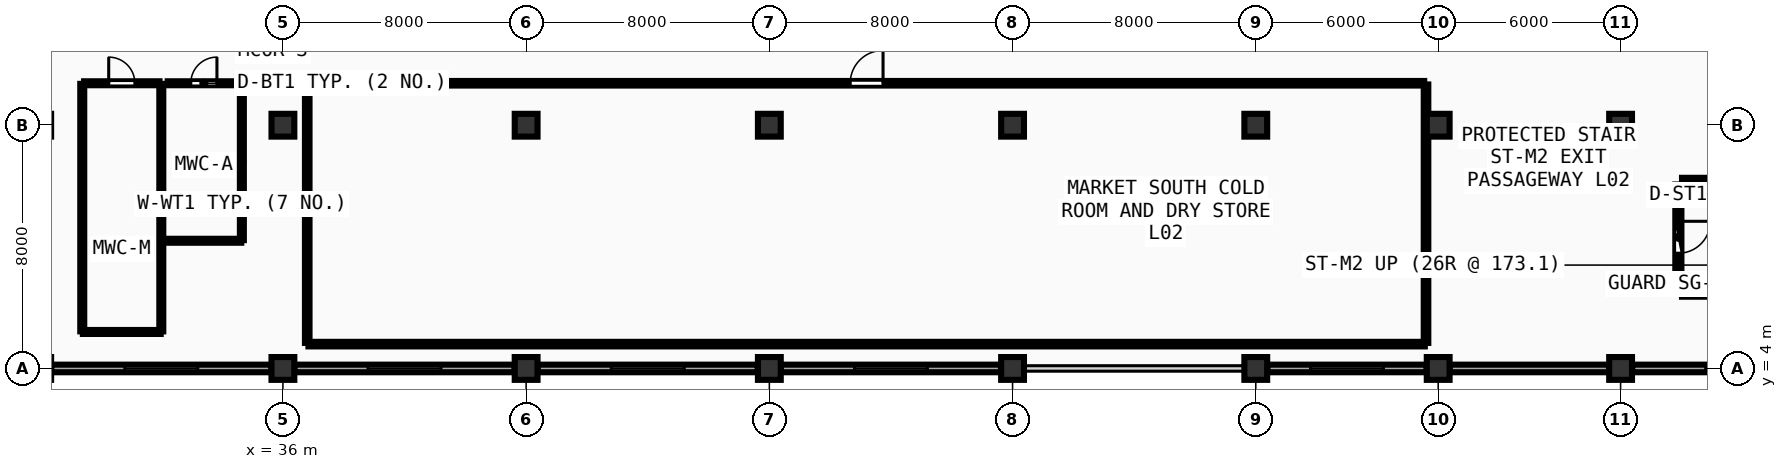
"""IFC4 building model, lengths in metres.
Left out: names, types, materials, properties, quantities, classifications, styles, units other than length and angle.
Written with IfcOpenShell. Run it as: python <this file> out.ifc"""

import sys

from ifc_helpers import new_model, si_unit, direction, frame, frame_2d, origin, origin_2d, place, context, subcontext, project, spatial, rectangle, extrude, element, fill, save


model = new_model("IFC4")
c1 = context("Model", 3, precision=1e-05, world=origin(), true_north=direction((0.0, 1.0)))
c2 = subcontext(c1, "Body", "Model", "MODEL_VIEW")
j1 = project(units=[si_unit("LENGTHUNIT", "METRE"), si_unit("PLANEANGLEUNIT", "RADIAN")], contexts=[c1])
p1 = place(None, origin())
s1 = spatial("IfcSite", under=j1, at=p1, CompositionType="ELEMENT")
p2 = place(p1, origin())
s2 = spatial("IfcBuilding", under=s1, at=p2, CompositionType="ELEMENT")
p3 = place(p2, frame((0.0, 0.0, 9.0)))
s3 = spatial("IfcBuildingStorey", under=s2, at=p3, CompositionType="ELEMENT", Elevation=9.0)
for number, where, z_axis, x_axis in (
    (1, (36.0, 4.0, 0.0), (0.0, 0.0, 1.0), (1.0, 0.0, 0.0)),
    (2, (36.0, 12.0, 0.0), (0.0, 0.0, 1.0), (1.0, 0.0, 0.0)),
    (3, (44.0, 4.0, 0.0), (0.0, 0.0, 1.0), (1.0, 0.0, 0.0)),
    (4, (44.0, 12.0, 0.0), (0.0, 0.0, 1.0), (1.0, 0.0, 0.0)),
    (5, (52.0, 4.0, 0.0), (0.0, 0.0, 1.0), (1.0, 0.0, 0.0)),
    (6, (52.0, 12.0, 0.0), (0.0, 0.0, 1.0), (1.0, 0.0, 0.0)),
    (7, (60.0, 4.0, 0.0), (0.0, 0.0, 1.0), (1.0, 0.0, 0.0)),
    (8, (60.0, 12.0, 0.0), (0.0, 0.0, 1.0), (1.0, 0.0, 0.0)),
    (9, (68.0, 4.0, 0.0), (0.0, 0.0, 1.0), (1.0, 0.0, 0.0)),
    (10, (68.0, 12.0, 0.0), (0.0, 0.0, 1.0), (1.0, 0.0, 0.0)),
    (11, (74.0, 4.0, 0.0), (0.0, 0.0, 1.0), (1.0, 0.0, 0.0)),
    (12, (74.0, 12.0, 0.0), (0.0, 0.0, 1.0), (1.0, 0.0, 0.0)),
    (13, (80.0, 4.0, 0.0), (0.0, 0.0, 1.0), (1.0, 0.0, 0.0)),
    (14, (80.0, 12.0, 0.0), (0.0, 0.0, 1.0), (1.0, 0.0, 0.0)),
):
    element("IfcColumn", number, at=place(p3, frame(where, z_axis=z_axis, x_axis=x_axis)), inside=s3, PredefinedType="COLUMN", context=c2, shape_type="SweptSolid", body=[
        extrude(rectangle(XDim=0.75, YDim=0.75, at=origin_2d()), origin(), (0.0, 0.0, 1.0), 4.5),
    ])
p4 = place(p3, frame((28.38, 4.0, 0.0), z_axis=(0.0, 0.0, 1.0), x_axis=(1.0, 0.0, 0.0)))
e15 = element("IfcWall", 15, at=p4, inside=s3, PredefinedType="SOLIDWALL", context=c2, shape_type="SweptSolid", body=[
    extrude(rectangle(XDim=7.24, YDim=0.25, at=frame_2d((3.62, 0.0))), origin(), (0.0, 0.0, 1.0), 3.42),
])
p5 = place(p4, frame((2.42, 0.0, 0.95)))
e16 = element("IfcOpeningElement", 16, at=p5, cuts=e15, PredefinedType="OPENING", context=c2, shape_type="SweptSolid", body=[
    extrude(rectangle(XDim=2.4, YDim=1.65, at=frame_2d((1.2, 0.825))), frame((0.0, 0.135, 0.0), z_axis=(0.0, -1.0, 0.0), x_axis=(1.0, 0.0, 0.0)), (0.0, 0.0, 1.0), 0.27),
])
p6 = place(p3, frame((36.38, 4.0, 0.0), z_axis=(0.0, 0.0, 1.0), x_axis=(1.0, 0.0, 0.0)))
e17 = element("IfcWall", 17, at=p6, inside=s3, PredefinedType="SOLIDWALL", context=c2, shape_type="SweptSolid", body=[
    extrude(rectangle(XDim=7.24, YDim=0.25, at=frame_2d((3.62, 0.0))), origin(), (0.0, 0.0, 1.0), 3.42),
])
p7 = place(p6, frame((2.42, 0.0, 0.95)))
e18 = element("IfcOpeningElement", 18, at=p7, cuts=e17, PredefinedType="OPENING", context=c2, shape_type="SweptSolid", body=[
    extrude(rectangle(XDim=2.4, YDim=1.65, at=frame_2d((1.2, 0.825))), frame((0.0, 0.135, 0.0), z_axis=(0.0, -1.0, 0.0), x_axis=(1.0, 0.0, 0.0)), (0.0, 0.0, 1.0), 0.27),
])
p8 = place(p3, frame((44.38, 4.0, 0.0), z_axis=(0.0, 0.0, 1.0), x_axis=(1.0, 0.0, 0.0)))
e19 = element("IfcWall", 19, at=p8, inside=s3, PredefinedType="SOLIDWALL", context=c2, shape_type="SweptSolid", body=[
    extrude(rectangle(XDim=7.24, YDim=0.25, at=frame_2d((3.62, 0.0))), origin(), (0.0, 0.0, 1.0), 3.42),
])
p9 = place(p8, frame((2.42, 0.0, 0.95)))
e20 = element("IfcOpeningElement", 20, at=p9, cuts=e19, PredefinedType="OPENING", context=c2, shape_type="SweptSolid", body=[
    extrude(rectangle(XDim=2.4, YDim=1.65, at=frame_2d((1.2, 0.825))), frame((0.0, 0.135, 0.0), z_axis=(0.0, -1.0, 0.0), x_axis=(1.0, 0.0, 0.0)), (0.0, 0.0, 1.0), 0.27),
])
p10 = place(p3, frame((52.38, 4.0, 0.0), z_axis=(0.0, 0.0, 1.0), x_axis=(1.0, 0.0, 0.0)))
e21 = element("IfcWall", 21, at=p10, inside=s3, PredefinedType="SOLIDWALL", context=c2, shape_type="SweptSolid", body=[
    extrude(rectangle(XDim=7.24, YDim=0.25, at=frame_2d((3.62, 0.0))), origin(), (0.0, 0.0, 1.0), 3.42),
])
p11 = place(p10, frame((2.42, 0.0, 0.95)))
e22 = element("IfcOpeningElement", 22, at=p11, cuts=e21, PredefinedType="OPENING", context=c2, shape_type="SweptSolid", body=[
    extrude(rectangle(XDim=2.4, YDim=1.65, at=frame_2d((1.2, 0.825))), frame((0.0, 0.135, 0.0), z_axis=(0.0, -1.0, 0.0), x_axis=(1.0, 0.0, 0.0)), (0.0, 0.0, 1.0), 0.27),
])
p12 = place(p3, frame((68.38, 4.0, 0.0), z_axis=(0.0, 0.0, 1.0), x_axis=(1.0, 0.0, 0.0)))
e23 = element("IfcWall", 23, at=p12, inside=s3, PredefinedType="SOLIDWALL", context=c2, shape_type="SweptSolid", body=[
    extrude(rectangle(XDim=5.24, YDim=0.25, at=frame_2d((2.62, 0.0))), origin(), (0.0, 0.0, 1.0), 3.42),
])
p13 = place(p12, frame((1.42, 0.0, 0.95)))
e24 = element("IfcOpeningElement", 24, at=p13, cuts=e23, PredefinedType="OPENING", context=c2, shape_type="SweptSolid", body=[
    extrude(rectangle(XDim=2.4, YDim=1.65, at=frame_2d((1.2, 0.825))), frame((0.0, 0.135, 0.0), z_axis=(0.0, -1.0, 0.0), x_axis=(1.0, 0.0, 0.0)), (0.0, 0.0, 1.0), 0.27),
])
p14 = place(p3, frame((74.38, 4.0, 0.0), z_axis=(0.0, 0.0, 1.0), x_axis=(1.0, 0.0, 0.0)))
e25 = element("IfcWall", 25, at=p14, inside=s3, PredefinedType="SOLIDWALL", context=c2, shape_type="SweptSolid", body=[
    extrude(rectangle(XDim=5.24, YDim=0.25, at=frame_2d((2.62, 0.0))), origin(), (0.0, 0.0, 1.0), 3.42),
])
p15 = place(p3, frame((80.38, 4.0, 0.0), z_axis=(0.0, 0.0, 1.0), x_axis=(1.0, 0.0, 0.0)))
e26 = element("IfcWall", 26, at=p15, inside=s3, PredefinedType="SOLIDWALL", context=c2, shape_type="SweptSolid", body=[
    extrude(rectangle(XDim=7.24, YDim=0.25, at=frame_2d((3.62, 0.0))), origin(), (0.0, 0.0, 1.0), 3.42),
])
p16 = place(p15, frame((2.42, 0.0, 0.95)))
e27 = element("IfcOpeningElement", 27, at=p16, cuts=e26, PredefinedType="OPENING", context=c2, shape_type="SweptSolid", body=[
    extrude(rectangle(XDim=2.4, YDim=1.65, at=frame_2d((1.2, 0.825))), frame((0.0, 0.135, 0.0), z_axis=(0.0, -1.0, 0.0), x_axis=(1.0, 0.0, 0.0)), (0.0, 0.0, 1.0), 0.27),
])
for number, where, z_axis, x_axis in (
    (28, (82.02, 6.46, 0.0), (0.0, 0.0, 1.0), (1.0, 0.0, 0.0)),
    (29, (89.78, 10.17, 0.0), (0.0, 0.0, 1.0), (-1.0, 0.0, 0.0)),
):
    element("IfcWall", number, at=place(p3, frame(where, z_axis=z_axis, x_axis=x_axis)), inside=s3, PredefinedType="SHEAR", context=c2, shape_type="SweptSolid", body=[
        extrude(rectangle(XDim=7.76, YDim=0.2, at=frame_2d((3.88, 0.0))), origin(), (0.0, 0.0, 1.0), 4.24),
    ])
p17 = place(p3, frame((81.9, 10.05, 0.0), z_axis=(0.0, 0.0, 1.0), x_axis=(0.0, -1.0, 0.0)))
e30 = element("IfcWall", 30, at=p17, inside=s3, PredefinedType="SHEAR", context=c2, shape_type="SweptSolid", body=[
    extrude(rectangle(XDim=3.47, YDim=0.2, at=frame_2d((1.735, 0.0))), origin(), (0.0, 0.0, 1.0), 4.24),
])
p18 = place(p17, frame((1.21, 0.0, 0.0)))
e31 = element("IfcOpeningElement", 31, at=p18, cuts=e30, PredefinedType="OPENING", context=c2, shape_type="SweptSolid", body=[
    extrude(rectangle(XDim=1.05, YDim=2.1, at=frame_2d((0.525, 1.05))), frame((0.0, 0.11, 0.0), z_axis=(0.0, -1.0, 0.0), x_axis=(1.0, 0.0, 0.0)), (0.0, 0.0, 1.0), 0.22),
])
p19 = place(p3, frame((29.46, 13.38, 0.0), z_axis=(0.0, 0.0, 1.0), x_axis=(1.0, 0.0, 0.0)))
e32 = element("IfcWall", 32, at=p19, inside=s3, PredefinedType="PLUMBINGWALL", context=c2, shape_type="SweptSolid", body=[
    extrude(rectangle(XDim=2.48, YDim=0.13, at=frame_2d((1.24, 0.0))), origin(), (0.0, 0.0, 1.0), 4.09),
])
p20 = place(p19, frame((0.81, 0.0, 0.0)))
e33 = element("IfcOpeningElement", 33, at=p20, cuts=e32, PredefinedType="OPENING", context=c2, shape_type="SweptSolid", body=[
    extrude(rectangle(XDim=0.86, YDim=2.05, at=frame_2d((0.43, 1.025))), frame((0.0, 0.075, 0.0), z_axis=(0.0, -1.0, 0.0), x_axis=(1.0, 0.0, 0.0)), (0.0, 0.0, 1.0), 0.15),
])
p21 = place(p3, frame((32.21, 13.38, 0.0), z_axis=(0.0, 0.0, 1.0), x_axis=(1.0, 0.0, 0.0)))
e34 = element("IfcWall", 34, at=p21, inside=s3, PredefinedType="PLUMBINGWALL", context=c2, shape_type="SweptSolid", body=[
    extrude(rectangle(XDim=2.38, YDim=0.13, at=frame_2d((1.19, 0.0))), origin(), (0.0, 0.0, 1.0), 4.09),
])
p22 = place(p21, frame((0.76, 0.0, 0.0)))
e35 = element("IfcOpeningElement", 35, at=p22, cuts=e34, PredefinedType="OPENING", context=c2, shape_type="SweptSolid", body=[
    extrude(rectangle(XDim=0.86, YDim=2.05, at=frame_2d((0.43, 1.025))), frame((0.0, 0.075, 0.0), z_axis=(0.0, -1.0, 0.0), x_axis=(1.0, 0.0, 0.0)), (0.0, 0.0, 1.0), 0.15),
])
p23 = place(p3, frame((36.86, 13.38, 0.0), z_axis=(0.0, 0.0, 1.0), x_axis=(1.0, 0.0, 0.0)))
e36 = element("IfcWall", 36, at=p23, inside=s3, PredefinedType="PARTITIONING", context=c2, shape_type="SweptSolid", body=[
    extrude(rectangle(XDim=36.68, YDim=0.15, at=frame_2d((18.34, 0.0))), origin(), (0.0, 0.0, 1.0), 3.425),
])
p24 = place(p23, frame((17.8, 0.0, 0.0)))
e37 = element("IfcOpeningElement", 37, at=p24, cuts=e36, PredefinedType="OPENING", context=c2, shape_type="SweptSolid", body=[
    extrude(rectangle(XDim=1.08, YDim=2.1, at=frame_2d((0.54, 1.05))), frame((0.0, 0.085, 0.0), z_axis=(0.0, -1.0, 0.0), x_axis=(1.0, 0.0, 0.0)), (0.0, 0.0, 1.0), 0.17),
])
p25 = place(p3, frame((29.42, 5.2, 0.0), z_axis=(0.0, 0.0, 1.0), x_axis=(1.0, 0.0, 0.0)))
e38 = element("IfcWall", 38, at=p25, inside=s3, PredefinedType="PLUMBINGWALL", context=c2, shape_type="SweptSolid", body=[
    extrude(rectangle(XDim=2.56, YDim=0.13, at=frame_2d((1.28, 0.0))), origin(), (0.0, 0.0, 1.0), 4.09),
])
for number, where, z_axis, x_axis in (
    (39, (32.0, 5.22, 0.0), (0.0, 0.0, 1.0), (0.0, 1.0, 0.0)),
    (40, (29.4, 13.36, 0.0), (0.0, 0.0, 1.0), (0.0, -1.0, 0.0)),
):
    element("IfcWall", number, at=place(p3, frame(where, z_axis=z_axis, x_axis=x_axis)), inside=s3, PredefinedType="PLUMBINGWALL", context=c2, shape_type="SweptSolid", body=[
        extrude(rectangle(XDim=8.14, YDim=0.13, at=frame_2d((4.07, 0.0))), origin(), (0.0, 0.0, 1.0), 3.425),
    ])
p26 = place(p3, frame((32.17, 8.2, 0.0), z_axis=(0.0, 0.0, 1.0), x_axis=(1.0, 0.0, 0.0)))
e41 = element("IfcWall", 41, at=p26, inside=s3, PredefinedType="PLUMBINGWALL", context=c2, shape_type="SweptSolid", body=[
    extrude(rectangle(XDim=2.46, YDim=0.13, at=frame_2d((1.23, 0.0))), origin(), (0.0, 0.0, 1.0), 4.09),
])
p27 = place(p3, frame((34.65, 8.22, 0.0), z_axis=(0.0, 0.0, 1.0), x_axis=(0.0, 1.0, 0.0)))
e42 = element("IfcWall", 42, at=p27, inside=s3, PredefinedType="PLUMBINGWALL", context=c2, shape_type="SweptSolid", body=[
    extrude(rectangle(XDim=5.14, YDim=0.13, at=frame_2d((2.57, 0.0))), origin(), (0.0, 0.0, 1.0), 3.425),
])
p28 = place(p3, frame((36.84, 4.8, 0.0), z_axis=(0.0, 0.0, 1.0), x_axis=(1.0, 0.0, 0.0)))
e43 = element("IfcWall", 43, at=p28, inside=s3, PredefinedType="PARTITIONING", context=c2, shape_type="SweptSolid", body=[
    extrude(rectangle(XDim=36.72, YDim=0.15, at=frame_2d((18.36, 0.0))), origin(), (0.0, 0.0, 1.0), 3.425),
])
for number, where, z_axis, x_axis in (
    (44, (73.6, 4.84, 0.0), (0.0, 0.0, 1.0), (0.0, 1.0, 0.0)),
    (45, (36.8, 13.34, 0.0), (0.0, 0.0, 1.0), (0.0, -1.0, 0.0)),
):
    element("IfcWall", number, at=place(p3, frame(where, z_axis=z_axis, x_axis=x_axis)), inside=s3, PredefinedType="PARTITIONING", context=c2, shape_type="SweptSolid", body=[
        extrude(rectangle(XDim=8.5, YDim=0.15, at=frame_2d((4.25, 0.0))), origin(), (0.0, 0.0, 1.0), 3.425),
    ])
p29 = place(p5, origin())
e46 = element("IfcWindow", 46, at=p29, inside=s3, PartitioningType="SINGLE_PANEL", PredefinedType="WINDOW", context=c2, shape_type="SweptSolid", body=[
    extrude(rectangle(XDim=2.4, YDim=1.65, at=frame_2d((1.2, 0.825))), frame((0.0, 0.03, 0.0), z_axis=(0.0, -1.0, 0.0), x_axis=(1.0, 0.0, 0.0)), (0.0, 0.0, 1.0), 0.06),
])
fill(e16, e46)
p30 = place(p7, origin())
e47 = element("IfcWindow", 47, at=p30, inside=s3, PartitioningType="SINGLE_PANEL", PredefinedType="WINDOW", context=c2, shape_type="SweptSolid", body=[
    extrude(rectangle(XDim=2.4, YDim=1.65, at=frame_2d((1.2, 0.825))), frame((0.0, 0.03, 0.0), z_axis=(0.0, -1.0, 0.0), x_axis=(1.0, 0.0, 0.0)), (0.0, 0.0, 1.0), 0.06),
])
fill(e18, e47)
p31 = place(p9, origin())
e48 = element("IfcWindow", 48, at=p31, inside=s3, PartitioningType="SINGLE_PANEL", PredefinedType="WINDOW", context=c2, shape_type="SweptSolid", body=[
    extrude(rectangle(XDim=2.4, YDim=1.65, at=frame_2d((1.2, 0.825))), frame((0.0, 0.03, 0.0), z_axis=(0.0, -1.0, 0.0), x_axis=(1.0, 0.0, 0.0)), (0.0, 0.0, 1.0), 0.06),
])
fill(e20, e48)
p32 = place(p11, origin())
e49 = element("IfcWindow", 49, at=p32, inside=s3, PartitioningType="SINGLE_PANEL", PredefinedType="WINDOW", context=c2, shape_type="SweptSolid", body=[
    extrude(rectangle(XDim=2.4, YDim=1.65, at=frame_2d((1.2, 0.825))), frame((0.0, 0.03, 0.0), z_axis=(0.0, -1.0, 0.0), x_axis=(1.0, 0.0, 0.0)), (0.0, 0.0, 1.0), 0.06),
])
fill(e22, e49)
p33 = place(p13, origin())
e50 = element("IfcWindow", 50, at=p33, inside=s3, PartitioningType="SINGLE_PANEL", PredefinedType="WINDOW", context=c2, shape_type="SweptSolid", body=[
    extrude(rectangle(XDim=2.4, YDim=1.65, at=frame_2d((1.2, 0.825))), frame((0.0, 0.03, 0.0), z_axis=(0.0, -1.0, 0.0), x_axis=(1.0, 0.0, 0.0)), (0.0, 0.0, 1.0), 0.06),
])
fill(e24, e50)
p34 = place(p16, origin())
e51 = element("IfcWindow", 51, at=p34, inside=s3, PartitioningType="SINGLE_PANEL", PredefinedType="WINDOW", context=c2, shape_type="SweptSolid", body=[
    extrude(rectangle(XDim=2.4, YDim=1.65, at=frame_2d((1.2, 0.825))), frame((0.0, 0.03, 0.0), z_axis=(0.0, -1.0, 0.0), x_axis=(1.0, 0.0, 0.0)), (0.0, 0.0, 1.0), 0.06),
])
fill(e27, e51)
p35 = place(p18, origin())
e52 = element("IfcDoor", 52, at=p35, inside=s3, OperationType="SINGLE_SWING_LEFT", PredefinedType="DOOR", context=c2, shape_type="SweptSolid", body=[
    extrude(rectangle(XDim=1.05, YDim=2.1, at=frame_2d((0.525, 1.05))), frame((0.0, 0.025, 0.0), z_axis=(0.0, -1.0, 0.0), x_axis=(1.0, 0.0, 0.0)), (0.0, 0.0, 1.0), 0.05),
])
fill(e31, e52)
p36 = place(p20, origin())
e53 = element("IfcDoor", 53, at=p36, inside=s3, OperationType="SINGLE_SWING_LEFT", PredefinedType="DOOR", context=c2, shape_type="SweptSolid", body=[
    extrude(rectangle(XDim=0.86, YDim=2.05, at=frame_2d((0.43, 1.025))), frame((0.0, 0.025, 0.0), z_axis=(0.0, -1.0, 0.0), x_axis=(1.0, 0.0, 0.0)), (0.0, 0.0, 1.0), 0.05),
])
fill(e33, e53)
p37 = place(p22, origin())
e54 = element("IfcDoor", 54, at=p37, inside=s3, OperationType="SINGLE_SWING_RIGHT", PredefinedType="DOOR", context=c2, shape_type="SweptSolid", body=[
    extrude(rectangle(XDim=0.86, YDim=2.05, at=frame_2d((0.43, 1.025))), frame((0.0, 0.025, 0.0), z_axis=(0.0, -1.0, 0.0), x_axis=(1.0, 0.0, 0.0)), (0.0, 0.0, 1.0), 0.05),
])
fill(e35, e54)
p38 = place(p24, origin())
e55 = element("IfcDoor", 55, at=p38, inside=s3, OperationType="SINGLE_SWING_RIGHT", PredefinedType="DOOR", context=c2, shape_type="SweptSolid", body=[
    extrude(rectangle(XDim=1.08, YDim=2.1, at=frame_2d((0.54, 1.05))), frame((0.0, 0.025, 0.0), z_axis=(0.0, -1.0, 0.0), x_axis=(1.0, 0.0, 0.0)), (0.0, 0.0, 1.0), 0.05),
])
fill(e37, e55)
save(model, sys.argv[1])
